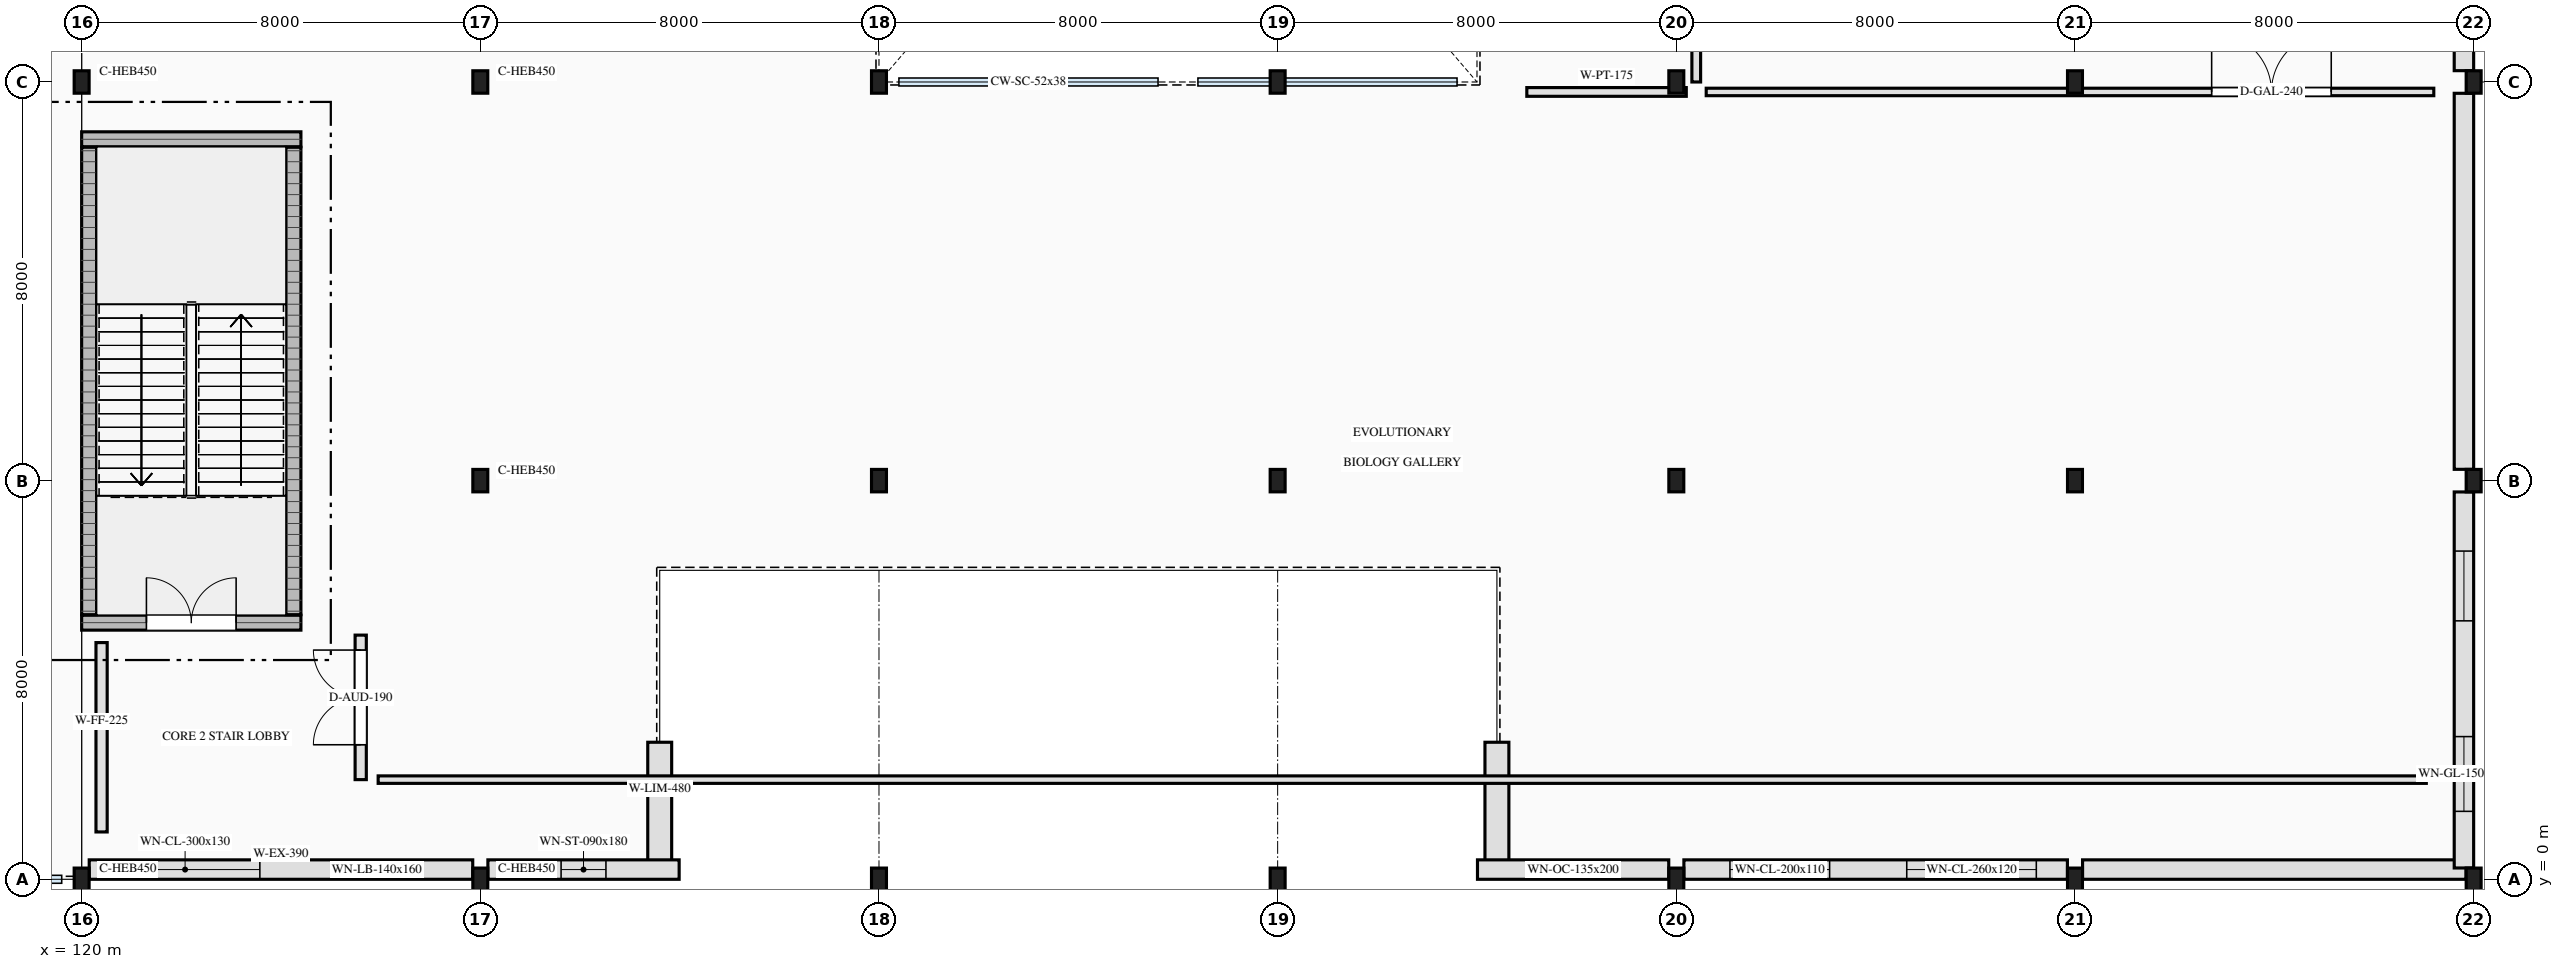
"""IFC4 building model, lengths in metres.
Left out: names, types, materials, properties, quantities, classifications, styles, units other than length and angle.
Written with IfcOpenShell. Run it as: python <this file> out.ifc"""

import sys

from ifc_helpers import new_model, si_unit, direction, frame, frame_2d, origin, origin_2d, place, context, subcontext, project, spatial, rectangle, i_section, extrude, element, fill, save


model = new_model("IFC4")
c1 = context("Model", 3, precision=1e-05, world=origin(), true_north=direction((0.0, 1.0)))
c2 = subcontext(c1, "Body", "Model", "MODEL_VIEW")
j1 = project(units=[si_unit("LENGTHUNIT", "METRE"), si_unit("PLANEANGLEUNIT", "RADIAN")], contexts=[c1])
p1 = place(None, origin())
s1 = spatial("IfcSite", under=j1, at=p1, CompositionType="ELEMENT")
p2 = place(p1, origin())
s2 = spatial("IfcBuilding", under=s1, at=p2, CompositionType="ELEMENT")
p3 = place(p2, frame((0.0, 0.0, 17.6)))
s3 = spatial("IfcBuildingStorey", under=s2, at=p3, CompositionType="ELEMENT", Elevation=17.6)
p4 = place(p3, frame((120.0, 5.15, 0.0), z_axis=(0.0, 0.0, 1.0), x_axis=(1.0, 0.0, 0.0)))
e1 = element("IfcWall", 1, at=p4, inside=s3, PredefinedType="SHEAR", context=c2, shape_type="SweptSolid", body=[
    extrude(rectangle(XDim=4.4, YDim=0.3, at=frame_2d((2.2, 0.0))), origin(), (0.0, 0.0, 1.0), 4.2),
])
p5 = place(p4, frame((1.3, 0.0, 0.0)))
e2 = element("IfcOpeningElement", 2, at=p5, cuts=e1, PredefinedType="OPENING", context=c2, shape_type="SweptSolid", body=[
    extrude(rectangle(XDim=1.8, YDim=2.2, at=frame_2d((0.9, 1.1))), frame((0.0, 0.16, 0.0), z_axis=(0.0, -1.0, 0.0), x_axis=(1.0, 0.0, 0.0)), (0.0, 0.0, 1.0), 0.32),
])
p6 = place(p3, frame((120.0, 14.85, 0.0), z_axis=(0.0, 0.0, 1.0), x_axis=(1.0, 0.0, 0.0)))
e3 = element("IfcWall", 3, at=p6, inside=s3, PredefinedType="SHEAR", context=c2, shape_type="SweptSolid", body=[
    extrude(rectangle(XDim=4.4, YDim=0.3, at=frame_2d((2.2, 0.0))), origin(), (0.0, 0.0, 1.0), 4.2),
])
for number, where, z_axis, x_axis in (
    (4, (120.15, 5.31, 0.0), (0.0, 0.0, 1.0), (0.0, 1.0, 0.0)),
    (5, (124.25, 5.31, 0.0), (0.0, 0.0, 1.0), (0.0, 1.0, 0.0)),
):
    element("IfcWall", number, at=place(p3, frame(where, z_axis=z_axis, x_axis=x_axis)), inside=s3, PredefinedType="SHEAR", context=c2, shape_type="SweptSolid", body=[
        extrude(rectangle(XDim=9.38, YDim=0.3, at=frame_2d((4.69, 0.0))), origin(), (0.0, 0.0, 1.0), 4.2),
    ])
for number, where, z_axis, x_axis in (
    (6, (120.0, 0.0, 0.0), (0.0, 0.0, 1.0), (1.0, 0.0, 0.0)),
    (7, (120.0, 16.0, 0.0), (0.0, 0.0, 1.0), (1.0, 0.0, 0.0)),
    (8, (128.0, 0.0, 0.0), (0.0, 0.0, 1.0), (1.0, 0.0, 0.0)),
    (9, (128.0, 8.0, 0.0), (0.0, 0.0, 1.0), (1.0, 0.0, 0.0)),
    (10, (128.0, 16.0, 0.0), (0.0, 0.0, 1.0), (1.0, 0.0, 0.0)),
    (11, (136.0, 0.0, 0.0), (0.0, 0.0, 1.0), (1.0, 0.0, 0.0)),
    (12, (136.0, 8.0, 0.0), (0.0, 0.0, 1.0), (1.0, 0.0, 0.0)),
    (13, (136.0, 16.0, 0.0), (0.0, 0.0, 1.0), (1.0, 0.0, 0.0)),
    (14, (144.0, 0.0, 0.0), (0.0, 0.0, 1.0), (1.0, 0.0, 0.0)),
    (15, (144.0, 8.0, 0.0), (0.0, 0.0, 1.0), (1.0, 0.0, 0.0)),
    (16, (144.0, 16.0, 0.0), (0.0, 0.0, 1.0), (1.0, 0.0, 0.0)),
    (17, (152.0, 0.0, 0.0), (0.0, 0.0, 1.0), (1.0, 0.0, 0.0)),
    (18, (152.0, 8.0, 0.0), (0.0, 0.0, 1.0), (1.0, 0.0, 0.0)),
    (19, (152.0, 16.0, 0.0), (0.0, 0.0, 1.0), (1.0, 0.0, 0.0)),
    (20, (160.0, 0.0, 0.0), (0.0, 0.0, 1.0), (1.0, 0.0, 0.0)),
    (21, (160.0, 8.0, 0.0), (0.0, 0.0, 1.0), (1.0, 0.0, 0.0)),
    (22, (160.0, 16.0, 0.0), (0.0, 0.0, 1.0), (1.0, 0.0, 0.0)),
    (23, (168.0, 0.0, 0.0), (0.0, 0.0, 1.0), (1.0, 0.0, 0.0)),
    (24, (168.0, 8.0, 0.0), (0.0, 0.0, 1.0), (1.0, 0.0, 0.0)),
    (25, (168.0, 16.0, 0.0), (0.0, 0.0, 1.0), (1.0, 0.0, 0.0)),
):
    element("IfcColumn", number, at=place(p3, frame(where, z_axis=z_axis, x_axis=x_axis)), inside=s3, PredefinedType="COLUMN", context=c2, shape_type="SweptSolid", body=[
        extrude(i_section(OverallWidth=0.3, OverallDepth=0.45, WebThickness=0.014, FlangeThickness=0.026, FilletRadius=0.027, at=origin_2d()), origin(), (0.0, 0.0, 1.0), 4.2),
    ])
for number, where, z_axis, x_axis in (
    (26, (131.6, 0.24, 0.0), (0.0, 0.0, 1.0), (0.0, 1.0, 0.0)),
    (27, (148.4, 0.24, 0.0), (0.0, 0.0, 1.0), (0.0, 1.0, 0.0)),
):
    element("IfcWall", number, at=place(p3, frame(where, z_axis=z_axis, x_axis=x_axis)), inside=s3, PredefinedType="SOLIDWALL", context=c2, shape_type="SweptSolid", body=[
        extrude(rectangle(XDim=2.51, YDim=0.48, at=frame_2d((1.255, 0.0))), origin(), (0.0, 0.0, 1.0), 3.96),
    ])
p7 = place(p3, frame((127.848, 0.195, 0.0), z_axis=(0.0, 0.0, 1.0), x_axis=(-1.0, 0.0, 0.0)))
e28 = element("IfcWall", 28, at=p7, inside=s3, PredefinedType="SOLIDWALL", context=c2, shape_type="SweptSolid", body=[
    extrude(rectangle(XDim=7.696, YDim=0.39, at=frame_2d((3.848, 0.0))), origin(), (0.0, 0.0, 1.0), 3.485),
])
p8 = place(p7, frame((1.224, 0.0, 0.85)))
e29 = element("IfcOpeningElement", 29, at=p8, cuts=e28, PredefinedType="OPENING", context=c2, shape_type="SweptSolid", body=[
    extrude(rectangle(XDim=1.4, YDim=1.6, at=frame_2d((0.7, 0.8))), frame((0.0, 0.205, 0.0), z_axis=(0.0, -1.0, 0.0), x_axis=(1.0, 0.0, 0.0)), (0.0, 0.0, 1.0), 0.41),
])
p9 = place(p7, frame((4.272, 0.0, 2.0)))
e30 = element("IfcOpeningElement", 30, at=p9, cuts=e28, PredefinedType="OPENING", context=c2, shape_type="SweptSolid", body=[
    extrude(rectangle(XDim=3.0, YDim=1.3, at=frame_2d((1.5, 0.65))), frame((0.0, 0.205, 0.0), z_axis=(0.0, -1.0, 0.0), x_axis=(1.0, 0.0, 0.0)), (0.0, 0.0, 1.0), 0.41),
])
p10 = place(p3, frame((131.99, 0.195, 0.0), z_axis=(0.0, 0.0, 1.0), x_axis=(-1.0, 0.0, 0.0)))
e31 = element("IfcWall", 31, at=p10, inside=s3, PredefinedType="SOLIDWALL", context=c2, shape_type="SweptSolid", body=[
    extrude(rectangle(XDim=3.838, YDim=0.39, at=frame_2d((1.919, 0.0))), origin(), (0.0, 0.0, 1.0), 3.505),
])
p11 = place(p10, frame((1.469, 0.0, 0.85)))
e32 = element("IfcOpeningElement", 32, at=p11, cuts=e31, PredefinedType="OPENING", context=c2, shape_type="SweptSolid", body=[
    extrude(rectangle(XDim=0.9, YDim=1.8, at=frame_2d((0.45, 0.9))), frame((0.0, 0.205, 0.0), z_axis=(0.0, -1.0, 0.0), x_axis=(1.0, 0.0, 0.0)), (0.0, 0.0, 1.0), 0.41),
])
p12 = place(p3, frame((159.848, 0.195, 0.0), z_axis=(0.0, 0.0, 1.0), x_axis=(-1.0, 0.0, 0.0)))
e33 = element("IfcWall", 33, at=p12, inside=s3, PredefinedType="SOLIDWALL", context=c2, shape_type="SweptSolid", body=[
    extrude(rectangle(XDim=7.696, YDim=0.39, at=frame_2d((3.848, 0.0))), origin(), (0.0, 0.0, 1.0), 3.505),
])
p13 = place(p12, frame((0.624, 0.0, 2.0)))
e34 = element("IfcOpeningElement", 34, at=p13, cuts=e33, PredefinedType="OPENING", context=c2, shape_type="SweptSolid", body=[
    extrude(rectangle(XDim=2.6, YDim=1.2, at=frame_2d((1.3, 0.6))), frame((0.0, 0.205, 0.0), z_axis=(0.0, -1.0, 0.0), x_axis=(1.0, 0.0, 0.0)), (0.0, 0.0, 1.0), 0.41),
])
p14 = place(p12, frame((4.772, 0.0, 2.0)))
e35 = element("IfcOpeningElement", 35, at=p14, cuts=e33, PredefinedType="OPENING", context=c2, shape_type="SweptSolid", body=[
    extrude(rectangle(XDim=2.0, YDim=1.1, at=frame_2d((1.0, 0.55))), frame((0.0, 0.205, 0.0), z_axis=(0.0, -1.0, 0.0), x_axis=(1.0, 0.0, 0.0)), (0.0, 0.0, 1.0), 0.41),
])
p15 = place(p3, frame((167.848, 0.195, 0.0), z_axis=(0.0, 0.0, 1.0), x_axis=(-1.0, 0.0, 0.0)))
e36 = element("IfcWall", 36, at=p15, inside=s3, PredefinedType="SOLIDWALL", context=c2, shape_type="SweptSolid", body=[
    extrude(rectangle(XDim=7.696, YDim=0.39, at=frame_2d((3.848, 0.0))), origin(), (0.0, 0.0, 1.0), 3.505),
])
p16 = place(p3, frame((151.848, 0.195, 0.0), z_axis=(0.0, 0.0, 1.0), x_axis=(-1.0, 0.0, 0.0)))
e37 = element("IfcWall", 37, at=p16, inside=s3, PredefinedType="SOLIDWALL", context=c2, shape_type="SweptSolid", body=[
    extrude(rectangle(XDim=3.838, YDim=0.39, at=frame_2d((1.919, 0.0))), origin(), (0.0, 0.0, 1.0), 3.505),
])
p17 = place(p16, frame((1.244, 0.0, 0.85)))
e38 = element("IfcOpeningElement", 38, at=p17, cuts=e37, PredefinedType="OPENING", context=c2, shape_type="SweptSolid", body=[
    extrude(rectangle(XDim=1.35, YDim=2.0, at=frame_2d((0.675, 1.0))), frame((0.0, 0.205, 0.0), z_axis=(0.0, -1.0, 0.0), x_axis=(1.0, 0.0, 0.0)), (0.0, 0.0, 1.0), 0.41),
])
p18 = place(p3, frame((167.805, 7.773, 0.0), z_axis=(0.0, 0.0, 1.0), x_axis=(0.0, -1.0, 0.0)))
e39 = element("IfcWall", 39, at=p18, inside=s3, PredefinedType="SOLIDWALL", context=c2, shape_type="SweptSolid", body=[
    extrude(rectangle(XDim=7.546, YDim=0.39, at=frame_2d((3.773, 0.0))), origin(), (0.0, 0.0, 1.0), 3.505),
])
p19 = place(p18, frame((1.187, 0.0, 0.85)))
e40 = element("IfcOpeningElement", 40, at=p19, cuts=e39, PredefinedType="OPENING", context=c2, shape_type="SweptSolid", body=[
    extrude(rectangle(XDim=1.4, YDim=1.6, at=frame_2d((0.7, 0.8))), frame((0.0, 0.205, 0.0), z_axis=(0.0, -1.0, 0.0), x_axis=(1.0, 0.0, 0.0)), (0.0, 0.0, 1.0), 0.41),
])
p20 = place(p18, frame((4.909, 0.0, 0.85)))
e41 = element("IfcOpeningElement", 41, at=p20, cuts=e39, PredefinedType="OPENING", context=c2, shape_type="SweptSolid", body=[
    extrude(rectangle(XDim=1.5, YDim=2.4, at=frame_2d((0.75, 1.2))), frame((0.0, 0.205, 0.0), z_axis=(0.0, -1.0, 0.0), x_axis=(1.0, 0.0, 0.0)), (0.0, 0.0, 1.0), 0.41),
])
p21 = place(p3, frame((167.805, 15.773, 0.0), z_axis=(0.0, 0.0, 1.0), x_axis=(0.0, -1.0, 0.0)))
e42 = element("IfcWall", 42, at=p21, inside=s3, PredefinedType="SOLIDWALL", context=c2, shape_type="SweptSolid", body=[
    extrude(rectangle(XDim=7.546, YDim=0.39, at=frame_2d((3.773, 0.0))), origin(), (0.0, 0.0, 1.0), 3.505),
])
p22 = place(p3, frame((167.805, 23.773, 0.0), z_axis=(0.0, 0.0, 1.0), x_axis=(0.0, -1.0, 0.0)))
e43 = element("IfcWall", 43, at=p22, inside=s3, PredefinedType="SOLIDWALL", context=c2, shape_type="SweptSolid", body=[
    extrude(rectangle(XDim=7.546, YDim=0.39, at=frame_2d((3.773, 0.0))), origin(), (0.0, 0.0, 1.0), 3.505),
])
p23 = place(p22, frame((1.187, 0.0, 0.85)))
e44 = element("IfcOpeningElement", 44, at=p23, cuts=e43, PredefinedType="OPENING", context=c2, shape_type="SweptSolid", body=[
    extrude(rectangle(XDim=1.4, YDim=1.6, at=frame_2d((0.7, 0.8))), frame((0.0, 0.205, 0.0), z_axis=(0.0, -1.0, 0.0), x_axis=(1.0, 0.0, 0.0)), (0.0, 0.0, 1.0), 0.41),
])
p24 = place(p22, frame((4.909, 0.0, 0.85)))
e45 = element("IfcOpeningElement", 45, at=p24, cuts=e43, PredefinedType="OPENING", context=c2, shape_type="SweptSolid", body=[
    extrude(rectangle(XDim=1.5, YDim=2.4, at=frame_2d((0.75, 1.2))), frame((0.0, 0.205, 0.0), z_axis=(0.0, -1.0, 0.0), x_axis=(1.0, 0.0, 0.0)), (0.0, 0.0, 1.0), 0.41),
])
p25 = place(p3, frame((125.6, 2.0, 0.0), z_axis=(0.0, 0.0, 1.0), x_axis=(0.0, 1.0, 0.0)))
e46 = element("IfcWall", 46, at=p25, inside=s3, PredefinedType="SOLIDWALL", context=c2, shape_type="SweptSolid", body=[
    extrude(rectangle(XDim=2.9, YDim=0.225, at=frame_2d((1.45, 0.0))), origin(), (0.0, 0.0, 1.0), 3.96),
])
p26 = place(p25, frame((0.7, 0.0, 0.0)))
e47 = element("IfcOpeningElement", 47, at=p26, cuts=e46, PredefinedType="OPENING", context=c2, shape_type="SweptSolid", body=[
    extrude(rectangle(XDim=1.9, YDim=2.35, at=frame_2d((0.95, 1.175))), frame((0.0, 0.123, 0.0), z_axis=(0.0, -1.0, 0.0), x_axis=(1.0, 0.0, 0.0)), (0.0, 0.0, 1.0), 0.245),
])
p27 = place(p3, frame((149.0, 15.8, 0.0), z_axis=(0.0, 0.0, 1.0), x_axis=(1.0, 0.0, 0.0)))
e48 = element("IfcWall", 48, at=p27, inside=s3, PredefinedType="PARTITIONING", context=c2, shape_type="SweptSolid", body=[
    extrude(rectangle(XDim=3.2, YDim=0.175, at=frame_2d((1.6, 0.0))), origin(), (0.0, 0.0, 1.0), 3.61),
])
p28 = place(p3, frame((152.4, 16.0, 0.0), z_axis=(0.0, 0.0, 1.0), x_axis=(0.0, 1.0, 0.0)))
e49 = element("IfcWall", 49, at=p28, inside=s3, PredefinedType="PARTITIONING", context=c2, shape_type="SweptSolid", body=[
    extrude(rectangle(XDim=16.6, YDim=0.175, at=frame_2d((8.3, 0.0))), origin(), (0.0, 0.0, 1.0), 3.96),
])
p29 = place(p28, frame((3.12, 0.0, 0.0)))
e50 = element("IfcOpeningElement", 50, at=p29, cuts=e49, PredefinedType="OPENING", context=c2, shape_type="SweptSolid", body=[
    extrude(rectangle(XDim=1.9, YDim=2.35, at=frame_2d((0.95, 1.175))), frame((0.0, 0.097, 0.0), z_axis=(0.0, -1.0, 0.0), x_axis=(1.0, 0.0, 0.0)), (0.0, 0.0, 1.0), 0.195),
])
p30 = place(p3, frame((152.6, 15.8, 0.0), z_axis=(0.0, 0.0, 1.0), x_axis=(1.0, 0.0, 0.0)))
e51 = element("IfcWall", 51, at=p30, inside=s3, PredefinedType="PARTITIONING", context=c2, shape_type="SweptSolid", body=[
    extrude(rectangle(XDim=14.6, YDim=0.15, at=frame_2d((7.3, 0.0))), origin(), (0.0, 0.0, 1.0), 3.61),
])
p31 = place(p30, frame((10.142, 0.0, 0.0)))
e52 = element("IfcOpeningElement", 52, at=p31, cuts=e51, PredefinedType="OPENING", context=c2, shape_type="SweptSolid", body=[
    extrude(rectangle(XDim=2.4, YDim=2.75, at=frame_2d((1.2, 1.375))), frame((0.0, 0.085, 0.0), z_axis=(0.0, -1.0, 0.0), x_axis=(1.0, 0.0, 0.0)), (0.0, 0.0, 1.0), 0.17),
])
p32 = place(p3, frame((120.4, 0.95, 0.0), z_axis=(0.0, 0.0, 1.0), x_axis=(0.0, 1.0, 0.0)))
e53 = element("IfcWall", 53, at=p32, inside=s3, PredefinedType="SOLIDWALL", context=c2, shape_type="SweptSolid", body=[
    extrude(rectangle(XDim=3.8, YDim=0.225, at=frame_2d((1.9, 0.0))), origin(), (0.0, 0.0, 1.0), 3.96),
])
p33 = place(p3, frame((125.95, 2.0, 0.0), z_axis=(0.0, 0.0, 1.0), x_axis=(1.0, 0.0, 0.0)))
e54 = element("IfcWall", 54, at=p33, inside=s3, PredefinedType="PARTITIONING", context=c2, shape_type="SweptSolid", body=[
    extrude(rectangle(XDim=41.1, YDim=0.15, at=frame_2d((20.55, 0.0))), origin(), (0.0, 0.0, 1.0), 3.96),
])
p34 = place(p8, origin())
e55 = element("IfcWindow", 55, at=p34, inside=s3, PartitioningType="SINGLE_PANEL", PredefinedType="WINDOW", context=c2, shape_type="SweptSolid", body=[
    extrude(rectangle(XDim=1.4, YDim=1.6, at=frame_2d((0.7, 0.8))), frame((0.0, 0.03, 0.0), z_axis=(0.0, -1.0, 0.0), x_axis=(1.0, 0.0, 0.0)), (0.0, 0.0, 1.0), 0.06),
])
fill(e29, e55)
p35 = place(p9, origin())
e56 = element("IfcWindow", 56, at=p35, inside=s3, PartitioningType="TRIPLE_PANEL_HORIZONTAL", PredefinedType="WINDOW", context=c2, shape_type="SweptSolid", body=[
    extrude(rectangle(XDim=3.0, YDim=1.3, at=frame_2d((1.5, 0.65))), frame((0.0, 0.03, 0.0), z_axis=(0.0, -1.0, 0.0), x_axis=(1.0, 0.0, 0.0)), (0.0, 0.0, 1.0), 0.06),
])
fill(e30, e56)
p36 = place(p11, origin())
e57 = element("IfcWindow", 57, at=p36, inside=s3, PartitioningType="SINGLE_PANEL", PredefinedType="WINDOW", context=c2, shape_type="SweptSolid", body=[
    extrude(rectangle(XDim=0.9, YDim=1.8, at=frame_2d((0.45, 0.9))), frame((0.0, 0.03, 0.0), z_axis=(0.0, -1.0, 0.0), x_axis=(1.0, 0.0, 0.0)), (0.0, 0.0, 1.0), 0.06),
])
fill(e32, e57)
p37 = place(p13, origin())
e58 = element("IfcWindow", 58, at=p37, inside=s3, PartitioningType="DOUBLE_PANEL_HORIZONTAL", PredefinedType="WINDOW", context=c2, shape_type="SweptSolid", body=[
    extrude(rectangle(XDim=2.6, YDim=1.2, at=frame_2d((1.3, 0.6))), frame((0.0, 0.03, 0.0), z_axis=(0.0, -1.0, 0.0), x_axis=(1.0, 0.0, 0.0)), (0.0, 0.0, 1.0), 0.06),
])
fill(e34, e58)
p38 = place(p14, origin())
e59 = element("IfcWindow", 59, at=p38, inside=s3, PartitioningType="DOUBLE_PANEL_HORIZONTAL", PredefinedType="WINDOW", context=c2, shape_type="SweptSolid", body=[
    extrude(rectangle(XDim=2.0, YDim=1.1, at=frame_2d((1.0, 0.55))), frame((0.0, 0.03, 0.0), z_axis=(0.0, -1.0, 0.0), x_axis=(1.0, 0.0, 0.0)), (0.0, 0.0, 1.0), 0.06),
])
fill(e35, e59)
p39 = place(p17, origin())
e60 = element("IfcWindow", 60, at=p39, inside=s3, PartitioningType="SINGLE_PANEL", PredefinedType="WINDOW", context=c2, shape_type="SweptSolid", body=[
    extrude(rectangle(XDim=1.35, YDim=2.0, at=frame_2d((0.675, 1.0))), frame((0.0, 0.03, 0.0), z_axis=(0.0, -1.0, 0.0), x_axis=(1.0, 0.0, 0.0)), (0.0, 0.0, 1.0), 0.06),
])
fill(e38, e60)
p40 = place(p19, origin())
e61 = element("IfcWindow", 61, at=p40, inside=s3, PartitioningType="SINGLE_PANEL", PredefinedType="WINDOW", context=c2, shape_type="SweptSolid", body=[
    extrude(rectangle(XDim=1.4, YDim=1.6, at=frame_2d((0.7, 0.8))), frame((0.0, 0.03, 0.0), z_axis=(0.0, -1.0, 0.0), x_axis=(1.0, 0.0, 0.0)), (0.0, 0.0, 1.0), 0.06),
])
fill(e40, e61)
p41 = place(p20, origin())
e62 = element("IfcWindow", 62, at=p41, inside=s3, PartitioningType="SINGLE_PANEL", PredefinedType="WINDOW", context=c2, shape_type="SweptSolid", body=[
    extrude(rectangle(XDim=1.5, YDim=2.4, at=frame_2d((0.75, 1.2))), frame((0.0, 0.03, 0.0), z_axis=(0.0, -1.0, 0.0), x_axis=(1.0, 0.0, 0.0)), (0.0, 0.0, 1.0), 0.06),
])
fill(e41, e62)
p42 = place(p5, origin())
e63 = element("IfcDoor", 63, at=p42, inside=s3, OperationType="DOUBLE_DOOR_SINGLE_SWING", PredefinedType="DOOR", context=c2, shape_type="SweptSolid", body=[
    extrude(rectangle(XDim=1.8, YDim=2.2, at=frame_2d((0.9, 1.1))), frame((0.0, 0.025, 0.0), z_axis=(0.0, -1.0, 0.0), x_axis=(1.0, 0.0, 0.0)), (0.0, 0.0, 1.0), 0.05),
])
fill(e2, e63)
p43 = place(p26, origin())
e64 = element("IfcDoor", 64, at=p43, inside=s3, OperationType="DOUBLE_DOOR_SINGLE_SWING", PredefinedType="DOOR", context=c2, shape_type="SweptSolid", body=[
    extrude(rectangle(XDim=1.9, YDim=2.35, at=frame_2d((0.95, 1.175))), frame((0.0, 0.025, 0.0), z_axis=(0.0, -1.0, 0.0), x_axis=(1.0, 0.0, 0.0)), (0.0, 0.0, 1.0), 0.05),
])
fill(e47, e64)
p44 = place(p31, origin())
e65 = element("IfcDoor", 65, at=p44, inside=s3, OperationType="DOUBLE_DOOR_DOUBLE_SWING", PredefinedType="DOOR", context=c2, shape_type="SweptSolid", body=[
    extrude(rectangle(XDim=2.4, YDim=2.75, at=frame_2d((1.2, 1.375))), frame((0.0, 0.025, 0.0), z_axis=(0.0, -1.0, 0.0), x_axis=(1.0, 0.0, 0.0)), (0.0, 0.0, 1.0), 0.05),
])
fill(e52, e65)
save(model, sys.argv[1])
